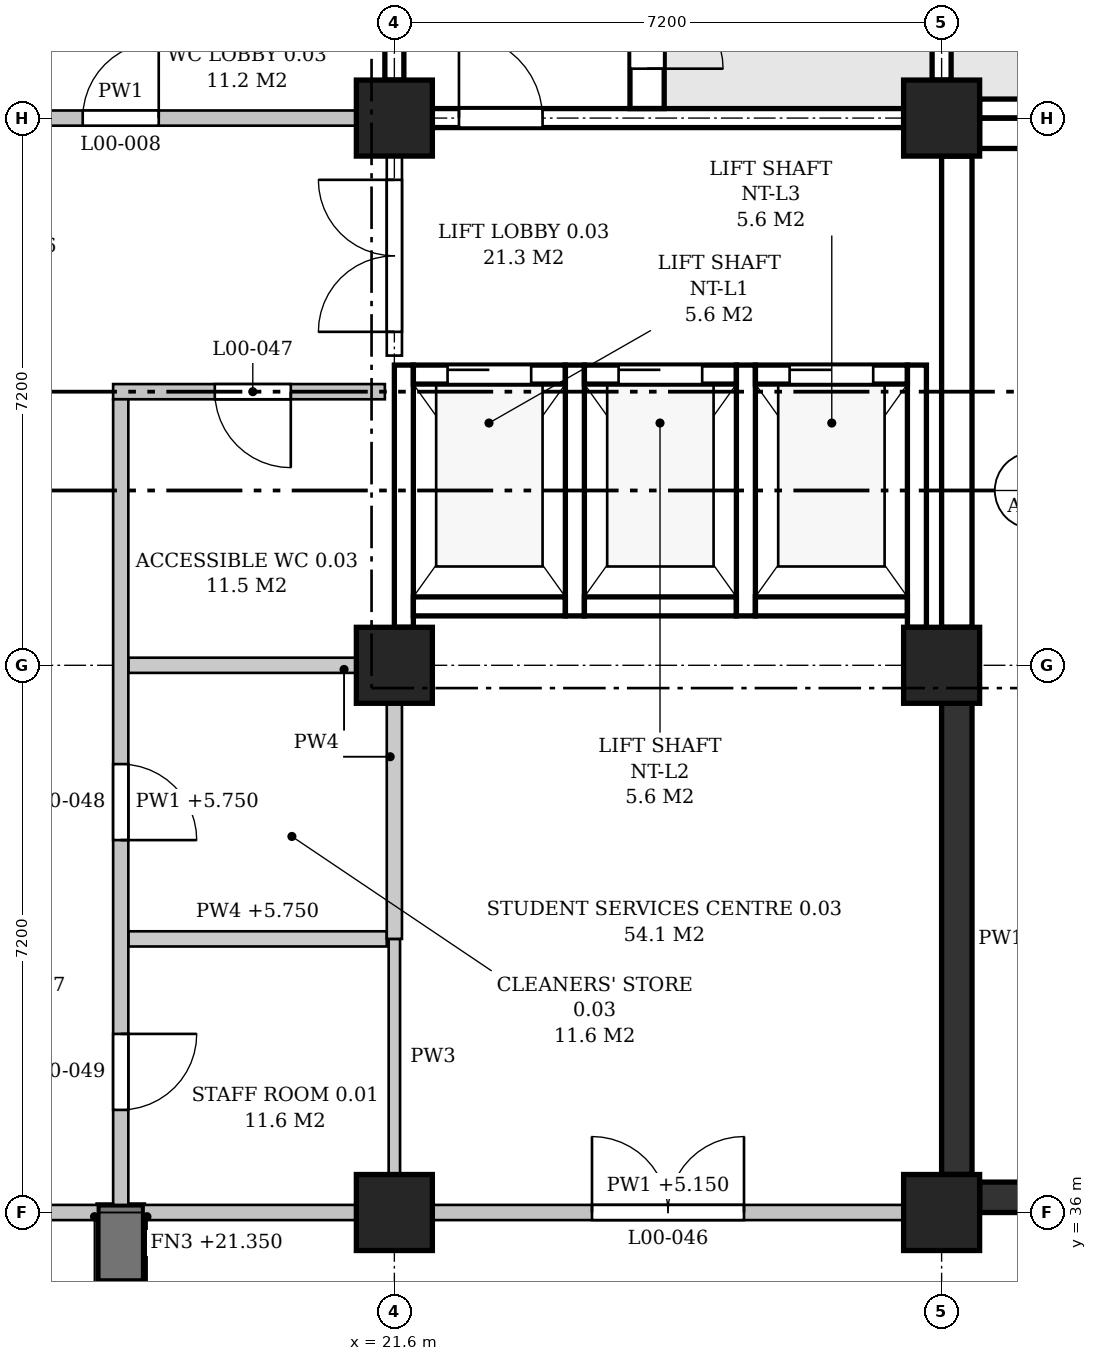
"""IFC4 building model, lengths in metres.
Left out: names, types, materials, properties, quantities, classifications, styles, units other than length and angle.
Written with IfcOpenShell. Run it as: python <this file> out.ifc"""

import sys

from ifc_helpers import new_model, si_unit, direction, frame, frame_2d, origin, origin_2d, place, context, subcontext, project, spatial, polyline, rectangle, outline, extrude, element, fill, save


model = new_model("IFC4")
c1 = context("Model", 3, precision=1e-05, world=origin(), true_north=direction((0.0, 1.0)))
c2 = subcontext(c1, "Body", "Model", "MODEL_VIEW")
j1 = project(units=[si_unit("LENGTHUNIT", "METRE"), si_unit("PLANEANGLEUNIT", "RADIAN")], contexts=[c1])
p1 = place(None, origin())
s1 = spatial("IfcSite", under=j1, at=p1, CompositionType="ELEMENT")
p2 = place(p1, origin())
s2 = spatial("IfcBuilding", under=s1, at=p2, CompositionType="ELEMENT")
p3 = place(p2, origin())
s3 = spatial("IfcBuildingStorey", under=s2, at=p3, CompositionType="ELEMENT", Elevation=0.0)
for number, where, z_axis, x_axis in (
    (1, (21.6, 36.0, 0.0), (0.0, 0.0, 1.0), (1.0, 0.0, 0.0)),
    (2, (21.6, 43.2, 0.0), (0.0, 0.0, 1.0), (1.0, 0.0, 0.0)),
    (3, (21.6, 50.4, 0.0), (0.0, 0.0, 1.0), (1.0, 0.0, 0.0)),
    (4, (28.8, 36.0, 0.0), (0.0, 0.0, 1.0), (1.0, 0.0, 0.0)),
    (5, (28.8, 43.2, 0.0), (0.0, 0.0, 1.0), (1.0, 0.0, 0.0)),
    (6, (28.8, 50.4, 0.0), (0.0, 0.0, 1.0), (1.0, 0.0, 0.0)),
):
    element("IfcColumn", number, at=place(p3, frame(where, z_axis=z_axis, x_axis=x_axis)), inside=s3, PredefinedType="COLUMN", context=c2, shape_type="SweptSolid", body=[
        extrude(rectangle(XDim=1.0, YDim=1.0, at=origin_2d()), origin(), (0.0, 0.0, 1.0), 6.0),
    ])
p4 = place(p3, frame((18.0, 36.1, 0.0), z_axis=(0.0, 0.0, 1.0), x_axis=(0.0, -1.0, 0.0)))
e7 = element("IfcWall", 7, at=p4, inside=s3, PredefinedType="POLYGONAL", context=c2, shape_type="SweptSolid", body=[
    extrude(outline(polyline([(1.0, 0.0), (1.0, 20.975), (0.75, 21.35), (0.35, 21.35), (0.35, 20.75), (0.0, 20.75), (0.0, 16.8), (0.35, 16.8), (0.35, 15.95), (0.0, 15.95), (0.0, 11.4), (0.35, 11.4), (0.35, 10.55), (0.0, 10.55), (0.0, 6.0), (0.35, 6.0), (0.35, 0.0), (1.0, 0.0)])), frame((0.0, 0.3, 0.0), z_axis=(0.0, -1.0, 0.0), x_axis=(1.0, 0.0, 0.0)), (0.0, 0.0, 1.0), 0.6),
])
p5 = place(p3, frame((29.3, 50.525, 0.0), z_axis=(0.0, 0.0, 1.0), x_axis=(1.0, 0.0, 0.0)))
e8 = element("IfcWall", 8, at=p5, inside=s3, PredefinedType="SHEAR", context=c2, shape_type="SweptSolid", body=[
    extrude(rectangle(XDim=6.275, YDim=0.25, at=frame_2d((3.137, 0.0))), origin(), (0.0, 0.0, 1.0), 5.05),
])
p6 = place(p3, frame((28.8, 50.9, -0.3), z_axis=(0.0, 0.0, 1.0), x_axis=(0.0, 1.0, 0.0)))
e9 = element("IfcWall", 9, at=p6, inside=s3, PredefinedType="SHEAR", context=c2, shape_type="SweptSolid", body=[
    extrude(rectangle(XDim=6.2, YDim=0.25, at=frame_2d((3.1, 0.0))), origin(), (0.0, 0.0, 1.0), 5.3),
])
p7 = place(p3, frame((22.1, 50.4, 0.0), z_axis=(0.0, 0.0, 1.0), x_axis=(1.0, 0.0, 0.0)))
e10 = element("IfcWall", 10, at=p7, inside=s3, PredefinedType="SHEAR", context=c2, shape_type="SweptSolid", body=[
    extrude(rectangle(XDim=6.2, YDim=0.25, at=frame_2d((3.1, 0.0))), origin(), (0.0, 0.0, 1.0), 5.0),
])
p8 = place(p7, frame((0.35, 0.0, 0.0)))
e11 = element("IfcOpeningElement", 11, at=p8, cuts=e10, PredefinedType="OPENING", context=c2, shape_type="SweptSolid", body=[
    extrude(rectangle(XDim=1.1, YDim=2.1, at=frame_2d((0.55, 1.05))), frame((0.0, 0.135, 0.0), z_axis=(0.0, -1.0, 0.0), x_axis=(1.0, 0.0, 0.0)), (0.0, 0.0, 1.0), 0.27),
])
p9 = place(p3, frame((21.6, 50.9, 0.0), z_axis=(0.0, 0.0, 1.0), x_axis=(0.0, 1.0, 0.0)))
e12 = element("IfcWall", 12, at=p9, inside=s3, PredefinedType="SHEAR", context=c2, shape_type="SweptSolid", body=[
    extrude(rectangle(XDim=6.2, YDim=0.25, at=frame_2d((3.1, 0.0))), origin(), (0.0, 0.0, 1.0), 5.0),
])
p10 = place(p3, frame((24.925, 50.525, 0.0), z_axis=(0.0, 0.0, 1.0), x_axis=(0.0, 1.0, 0.0)))
e13 = element("IfcWall", 13, at=p10, inside=s3, PredefinedType="SHEAR", context=c2, shape_type="SweptSolid", body=[
    extrude(rectangle(XDim=6.925, YDim=0.45, at=frame_2d((3.462, 0.0))), origin(), (0.0, 0.0, 1.0), 5.75),
])
p11 = place(p10, frame((0.525, 0.0, 0.0)))
e14 = element("IfcOpeningElement", 14, at=p11, cuts=e13, PredefinedType="OPENING", context=c2, shape_type="SweptSolid", body=[
    extrude(rectangle(XDim=1.0, YDim=2.1, at=frame_2d((0.5, 1.05))), frame((0.0, 0.235, 0.0), z_axis=(0.0, -1.0, 0.0), x_axis=(1.0, 0.0, 0.0)), (0.0, 0.0, 1.0), 0.47),
])
p12 = place(p3, frame((21.725, 43.7, -0.3), z_axis=(0.0, 0.0, 1.0), x_axis=(0.0, 1.0, 0.0)))
e15 = element("IfcWall", 15, at=p12, inside=s3, PredefinedType="SHEAR", context=c2, shape_type="SweptSolid", body=[
    extrude(rectangle(XDim=3.45, YDim=0.25, at=frame_2d((1.725, 0.0))), origin(), (0.0, 0.0, 1.0), 5.3),
])
for number, where, z_axis, x_axis in (
    (16, (23.975, 43.85, -0.3), (0.0, 0.0, 1.0), (0.0, 1.0, 0.0)),
    (17, (26.225, 43.85, -0.3), (0.0, 0.0, 1.0), (0.0, 1.0, 0.0)),
):
    element("IfcWall", number, at=place(p3, frame(where, z_axis=z_axis, x_axis=x_axis)), inside=s3, PredefinedType="SHEAR", context=c2, shape_type="SweptSolid", body=[
        extrude(rectangle(XDim=3.3, YDim=0.25, at=frame_2d((1.65, 0.0))), origin(), (0.0, 0.0, 1.0), 6.05),
    ])
p13 = place(p3, frame((28.475, 43.7, -0.3), z_axis=(0.0, 0.0, 1.0), x_axis=(0.0, 1.0, 0.0)))
e18 = element("IfcWall", 18, at=p13, inside=s3, PredefinedType="SHEAR", context=c2, shape_type="SweptSolid", body=[
    extrude(rectangle(XDim=3.45, YDim=0.25, at=frame_2d((1.725, 0.0))), origin(), (0.0, 0.0, 1.0), 5.35),
])
p14 = place(p3, frame((21.85, 47.025, -0.3), z_axis=(0.0, 0.0, 1.0), x_axis=(1.0, 0.0, 0.0)))
e19 = element("IfcWall", 19, at=p14, inside=s3, PredefinedType="SHEAR", context=c2, shape_type="SweptSolid", body=[
    extrude(rectangle(XDim=2.0, YDim=0.25, at=frame_2d((1.0, 0.0))), origin(), (0.0, 0.0, 1.0), 6.05),
])
p15 = place(p14, frame((0.45, 0.0, 0.3)))
e20 = element("IfcOpeningElement", 20, at=p15, cuts=e19, PredefinedType="OPENING", context=c2, shape_type="SweptSolid", body=[
    extrude(rectangle(XDim=1.1, YDim=2.1, at=frame_2d((0.55, 1.05))), frame((0.0, 0.135, 0.0), z_axis=(0.0, -1.0, 0.0), x_axis=(1.0, 0.0, 0.0)), (0.0, 0.0, 1.0), 0.27),
])
p16 = place(p3, frame((21.85, 43.975, -0.3), z_axis=(0.0, 0.0, 1.0), x_axis=(1.0, 0.0, 0.0)))
e21 = element("IfcWall", 21, at=p16, inside=s3, PredefinedType="SHEAR", context=c2, shape_type="SweptSolid", body=[
    extrude(rectangle(XDim=2.0, YDim=0.25, at=frame_2d((1.0, 0.0))), origin(), (0.0, 0.0, 1.0), 6.05),
])
p17 = place(p3, frame((24.1, 47.025, -0.3), z_axis=(0.0, 0.0, 1.0), x_axis=(1.0, 0.0, 0.0)))
e22 = element("IfcWall", 22, at=p17, inside=s3, PredefinedType="SHEAR", context=c2, shape_type="SweptSolid", body=[
    extrude(rectangle(XDim=2.0, YDim=0.25, at=frame_2d((1.0, 0.0))), origin(), (0.0, 0.0, 1.0), 6.05),
])
p18 = place(p17, frame((0.45, 0.0, 0.3)))
e23 = element("IfcOpeningElement", 23, at=p18, cuts=e22, PredefinedType="OPENING", context=c2, shape_type="SweptSolid", body=[
    extrude(rectangle(XDim=1.1, YDim=2.1, at=frame_2d((0.55, 1.05))), frame((0.0, 0.135, 0.0), z_axis=(0.0, -1.0, 0.0), x_axis=(1.0, 0.0, 0.0)), (0.0, 0.0, 1.0), 0.27),
])
p19 = place(p3, frame((24.1, 43.975, -0.3), z_axis=(0.0, 0.0, 1.0), x_axis=(1.0, 0.0, 0.0)))
e24 = element("IfcWall", 24, at=p19, inside=s3, PredefinedType="SHEAR", context=c2, shape_type="SweptSolid", body=[
    extrude(rectangle(XDim=2.0, YDim=0.25, at=frame_2d((1.0, 0.0))), origin(), (0.0, 0.0, 1.0), 6.05),
])
p20 = place(p3, frame((26.35, 47.025, -0.3), z_axis=(0.0, 0.0, 1.0), x_axis=(1.0, 0.0, 0.0)))
e25 = element("IfcWall", 25, at=p20, inside=s3, PredefinedType="SHEAR", context=c2, shape_type="SweptSolid", body=[
    extrude(rectangle(XDim=2.0, YDim=0.25, at=frame_2d((1.0, 0.0))), origin(), (0.0, 0.0, 1.0), 6.05),
])
p21 = place(p20, frame((0.45, 0.0, 0.3)))
e26 = element("IfcOpeningElement", 26, at=p21, cuts=e25, PredefinedType="OPENING", context=c2, shape_type="SweptSolid", body=[
    extrude(rectangle(XDim=1.1, YDim=2.1, at=frame_2d((0.55, 1.05))), frame((0.0, 0.135, 0.0), z_axis=(0.0, -1.0, 0.0), x_axis=(1.0, 0.0, 0.0)), (0.0, 0.0, 1.0), 0.27),
])
p22 = place(p3, frame((26.35, 43.975, -0.3), z_axis=(0.0, 0.0, 1.0), x_axis=(1.0, 0.0, 0.0)))
e27 = element("IfcWall", 27, at=p22, inside=s3, PredefinedType="SHEAR", context=c2, shape_type="SweptSolid", body=[
    extrude(rectangle(XDim=2.0, YDim=0.25, at=frame_2d((1.0, 0.0))), origin(), (0.0, 0.0, 1.0), 6.05),
])
p23 = place(p3, frame((14.9, 36.0, 0.0), z_axis=(0.0, 0.0, 1.0), x_axis=(1.0, 0.0, 0.0)))
e28 = element("IfcWall", 28, at=p23, inside=s3, PredefinedType="PARTITIONING", context=c2, shape_type="SweptSolid", body=[
    extrude(rectangle(XDim=2.8, YDim=0.2, at=frame_2d((1.4, 0.0))), origin(), (0.0, 0.0, 1.0), 5.15),
])
p24 = place(p23, frame((0.9, 0.0, 0.0)))
e29 = element("IfcOpeningElement", 29, at=p24, cuts=e28, PredefinedType="OPENING", context=c2, shape_type="SweptSolid", body=[
    extrude(rectangle(XDim=1.0, YDim=2.1, at=frame_2d((0.5, 1.05))), frame((0.0, 0.11, 0.0), z_axis=(0.0, -1.0, 0.0), x_axis=(1.0, 0.0, 0.0)), (0.0, 0.0, 1.0), 0.22),
])
p25 = place(p3, frame((18.3, 36.0, 0.0), z_axis=(0.0, 0.0, 1.0), x_axis=(1.0, 0.0, 0.0)))
e30 = element("IfcWall", 30, at=p25, inside=s3, PredefinedType="PARTITIONING", context=c2, shape_type="SweptSolid", body=[
    extrude(rectangle(XDim=2.8, YDim=0.2, at=frame_2d((1.4, 0.0))), origin(), (0.0, 0.0, 1.0), 5.15),
])
p26 = place(p3, frame((22.1, 36.0, 0.0), z_axis=(0.0, 0.0, 1.0), x_axis=(1.0, 0.0, 0.0)))
e31 = element("IfcWall", 31, at=p26, inside=s3, PredefinedType="PARTITIONING", context=c2, shape_type="SweptSolid", body=[
    extrude(rectangle(XDim=6.2, YDim=0.2, at=frame_2d((3.1, 0.0))), origin(), (0.0, 0.0, 1.0), 5.15),
])
p27 = place(p26, frame((2.1, 0.0, 0.0)))
e32 = element("IfcOpeningElement", 32, at=p27, cuts=e31, PredefinedType="OPENING", context=c2, shape_type="SweptSolid", body=[
    extrude(rectangle(XDim=2.0, YDim=2.1, at=frame_2d((1.0, 1.05))), frame((0.0, 0.11, 0.0), z_axis=(0.0, -1.0, 0.0), x_axis=(1.0, 0.0, 0.0)), (0.0, 0.0, 1.0), 0.22),
])
p28 = place(p3, frame((29.3, 36.2, 0.0), z_axis=(0.0, 0.0, 1.0), x_axis=(1.0, 0.0, 0.0)))
e33 = element("IfcWall", 33, at=p28, inside=s3, PredefinedType="SOLIDWALL", context=c2, shape_type="SweptSolid", body=[
    extrude(rectangle(XDim=6.275, YDim=0.4, at=frame_2d((3.137, 0.0))), origin(), (0.0, 0.0, 1.0), 10.7),
])
p29 = place(p3, frame((18.1, 39.6, 0.0), z_axis=(0.0, 0.0, 1.0), x_axis=(1.0, 0.0, 0.0)))
e34 = element("IfcWall", 34, at=p29, inside=s3, PredefinedType="PARTITIONING", context=c2, shape_type="SweptSolid", body=[
    extrude(outline(polyline([(0.0, 0.0), (3.4, 0.0), (3.4, 5.0), (3.25, 5.0), (3.25, 5.75), (0.0, 5.75), (0.0, 0.0)])), frame((0.0, 0.1, 0.0), z_axis=(0.0, -1.0, 0.0), x_axis=(1.0, 0.0, 0.0)), (0.0, 0.0, 1.0), 0.2),
])
p30 = place(p3, frame((18.1, 43.2, 0.0), z_axis=(0.0, 0.0, 1.0), x_axis=(1.0, 0.0, 0.0)))
e35 = element("IfcWall", 35, at=p30, inside=s3, PredefinedType="PARTITIONING", context=c2, shape_type="SweptSolid", body=[
    extrude(rectangle(XDim=3.0, YDim=0.2, at=frame_2d((1.5, 0.0))), origin(), (0.0, 0.0, 1.0), 5.0),
])
p31 = place(p3, frame((17.9, 46.8, 0.0), z_axis=(0.0, 0.0, 1.0), x_axis=(1.0, 0.0, 0.0)))
e36 = element("IfcWall", 36, at=p31, inside=s3, PredefinedType="PARTITIONING", context=c2, shape_type="SweptSolid", body=[
    extrude(outline(polyline([(0.0, 0.0), (3.575, 0.0), (3.575, 5.0), (3.45, 5.0), (3.45, 5.75), (0.0, 5.75), (0.0, 0.0)])), frame((0.0, 0.1, 0.0), z_axis=(0.0, -1.0, 0.0), x_axis=(1.0, 0.0, 0.0)), (0.0, 0.0, 1.0), 0.2),
])
p32 = place(p31, frame((1.338, 0.0, 0.0)))
e37 = element("IfcOpeningElement", 37, at=p32, cuts=e36, PredefinedType="OPENING", context=c2, shape_type="SweptSolid", body=[
    extrude(rectangle(XDim=1.0, YDim=2.1, at=frame_2d((0.5, 1.05))), frame((0.0, 0.11, 0.0), z_axis=(0.0, -1.0, 0.0), x_axis=(1.0, 0.0, 0.0)), (0.0, 0.0, 1.0), 0.22),
])
p33 = place(p3, frame((29.3, 50.2, 0.0), z_axis=(0.0, 0.0, 1.0), x_axis=(1.0, 0.0, 0.0)))
e38 = element("IfcWall", 38, at=p33, inside=s3, PredefinedType="SOLIDWALL", context=c2, shape_type="SweptSolid", body=[
    extrude(rectangle(XDim=6.275, YDim=0.4, at=frame_2d((3.137, 0.0))), origin(), (0.0, 0.0, 1.0), 10.7),
])
p34 = place(p3, frame((14.9, 50.4, 0.0), z_axis=(0.0, 0.0, 1.0), x_axis=(1.0, 0.0, 0.0)))
e39 = element("IfcWall", 39, at=p34, inside=s3, PredefinedType="PARTITIONING", context=c2, shape_type="SweptSolid", body=[
    extrude(rectangle(XDim=6.2, YDim=0.2, at=frame_2d((3.1, 0.0))), origin(), (0.0, 0.0, 1.0), 5.0),
])
p35 = place(p34, frame((2.6, 0.0, 0.0)))
e40 = element("IfcOpeningElement", 40, at=p35, cuts=e39, PredefinedType="OPENING", context=c2, shape_type="SweptSolid", body=[
    extrude(rectangle(XDim=1.0, YDim=2.1, at=frame_2d((0.5, 1.05))), frame((0.0, 0.11, 0.0), z_axis=(0.0, -1.0, 0.0), x_axis=(1.0, 0.0, 0.0)), (0.0, 0.0, 1.0), 0.22),
])
p36 = place(p3, frame((18.0, 36.1, 0.0), z_axis=(0.0, 0.0, 1.0), x_axis=(0.0, 1.0, 0.0)))
e41 = element("IfcWall", 41, at=p36, inside=s3, PredefinedType="PARTITIONING", context=c2, shape_type="SweptSolid", body=[
    extrude(outline(polyline([(0.0, 0.0), (10.6, 0.0), (10.6, 5.75), (7.35, 5.75), (7.35, 5.0), (6.85, 5.0), (6.85, 5.75), (0.15, 5.75), (0.15, 5.15), (0.0, 5.15), (0.0, 0.0)])), frame((0.0, 0.1, 0.0), z_axis=(0.0, -1.0, 0.0), x_axis=(1.0, 0.0, 0.0)), (0.0, 0.0, 1.0), 0.2),
])
p37 = place(p36, frame((4.8, 0.0, 0.0)))
e42 = element("IfcOpeningElement", 42, at=p37, cuts=e41, PredefinedType="OPENING", context=c2, shape_type="SweptSolid", body=[
    extrude(rectangle(XDim=1.0, YDim=2.1, at=frame_2d((0.5, 1.05))), frame((0.0, 0.11, 0.0), z_axis=(0.0, -1.0, 0.0), x_axis=(1.0, 0.0, 0.0)), (0.0, 0.0, 1.0), 0.22),
])
p38 = place(p36, frame((1.25, 0.0, 0.0)))
e43 = element("IfcOpeningElement", 43, at=p38, cuts=e41, PredefinedType="OPENING", context=c2, shape_type="SweptSolid", body=[
    extrude(rectangle(XDim=1.0, YDim=2.1, at=frame_2d((0.5, 1.05))), frame((0.0, 0.11, 0.0), z_axis=(0.0, -1.0, 0.0), x_axis=(1.0, 0.0, 0.0)), (0.0, 0.0, 1.0), 0.22),
])
p39 = place(p3, frame((21.6, 36.5, 0.0), z_axis=(0.0, 0.0, 1.0), x_axis=(0.0, 1.0, 0.0)))
e44 = element("IfcWall", 44, at=p39, inside=s3, PredefinedType="PARTITIONING", context=c2, shape_type="SweptSolid", body=[
    extrude(rectangle(XDim=3.1, YDim=0.15, at=frame_2d((1.55, 0.0))), origin(), (0.0, 0.0, 1.0), 5.0),
])
p40 = place(p3, frame((21.6, 39.6, 0.0), z_axis=(0.0, 0.0, 1.0), x_axis=(0.0, 1.0, 0.0)))
e45 = element("IfcWall", 45, at=p40, inside=s3, PredefinedType="PARTITIONING", context=c2, shape_type="SweptSolid", body=[
    extrude(rectangle(XDim=3.1, YDim=0.2, at=frame_2d((1.55, 0.0))), origin(), (0.0, 0.0, 1.0), 5.0),
])
p41 = place(p3, frame((21.6, 47.275, 0.0), z_axis=(0.0, 0.0, 1.0), x_axis=(0.0, 1.0, 0.0)))
e46 = element("IfcWall", 46, at=p41, inside=s3, PredefinedType="PARTITIONING", context=c2, shape_type="SweptSolid", body=[
    extrude(rectangle(XDim=2.625, YDim=0.2, at=frame_2d((1.312, 0.0))), origin(), (0.0, 0.0, 1.0), 5.0),
])
p42 = place(p41, frame((0.312, 0.0, 0.0)))
e47 = element("IfcOpeningElement", 47, at=p42, cuts=e46, PredefinedType="OPENING", context=c2, shape_type="SweptSolid", body=[
    extrude(rectangle(XDim=2.0, YDim=2.4, at=frame_2d((1.0, 1.2))), frame((0.0, 0.11, 0.0), z_axis=(0.0, -1.0, 0.0), x_axis=(1.0, 0.0, 0.0)), (0.0, 0.0, 1.0), 0.22),
])
for number, where, z_axis, x_axis in (
    (48, (29.0, 36.5, 0.0), (0.0, 0.0, 1.0), (0.0, 1.0, 0.0)),
    (49, (29.0, 43.7, 0.0), (0.0, 0.0, 1.0), (0.0, 1.0, 0.0)),
):
    element("IfcWall", number, at=place(p3, frame(where, z_axis=z_axis, x_axis=x_axis)), inside=s3, PredefinedType="SOLIDWALL", context=c2, shape_type="SweptSolid", body=[
        extrude(rectangle(XDim=6.2, YDim=0.4, at=frame_2d((3.1, 0.0))), origin(), (0.0, 0.0, 1.0), 10.55),
    ])
p43 = place(p11, frame((1.0, 0.0, 0.0), z_axis=(0.0, 0.0, 1.0), x_axis=(-1.0, 0.0, 0.0)))
e50 = element("IfcDoor", 50, at=p43, inside=s3, OperationType="SINGLE_SWING_RIGHT", PredefinedType="DOOR", context=c2, shape_type="SweptSolid", body=[
    extrude(rectangle(XDim=1.0, YDim=2.1, at=frame_2d((0.5, 1.05))), frame((0.0, 0.025, 0.0), z_axis=(0.0, -1.0, 0.0), x_axis=(1.0, 0.0, 0.0)), (0.0, 0.0, 1.0), 0.05),
])
fill(e14, e50)
p44 = place(p8, origin())
e51 = element("IfcDoor", 51, at=p44, inside=s3, OperationType="SINGLE_SWING_LEFT", PredefinedType="DOOR", context=c2, shape_type="SweptSolid", body=[
    extrude(rectangle(XDim=1.1, YDim=2.1, at=frame_2d((0.55, 1.05))), frame((0.0, 0.025, 0.0), z_axis=(0.0, -1.0, 0.0), x_axis=(1.0, 0.0, 0.0)), (0.0, 0.0, 1.0), 0.05),
])
fill(e11, e51)
p45 = place(p15, origin())
e52 = element("IfcDoor", 52, at=p45, inside=s3, OperationType="SLIDING_TO_LEFT", PredefinedType="DOOR", context=c2, shape_type="SweptSolid", body=[
    extrude(rectangle(XDim=1.1, YDim=2.1, at=frame_2d((0.55, 1.05))), frame((0.0, 0.025, 0.0), z_axis=(0.0, -1.0, 0.0), x_axis=(1.0, 0.0, 0.0)), (0.0, 0.0, 1.0), 0.05),
])
fill(e20, e52)
p46 = place(p18, origin())
e53 = element("IfcDoor", 53, at=p46, inside=s3, OperationType="SLIDING_TO_LEFT", PredefinedType="DOOR", context=c2, shape_type="SweptSolid", body=[
    extrude(rectangle(XDim=1.1, YDim=2.1, at=frame_2d((0.55, 1.05))), frame((0.0, 0.025, 0.0), z_axis=(0.0, -1.0, 0.0), x_axis=(1.0, 0.0, 0.0)), (0.0, 0.0, 1.0), 0.05),
])
fill(e23, e53)
p47 = place(p21, origin())
e54 = element("IfcDoor", 54, at=p47, inside=s3, OperationType="SLIDING_TO_LEFT", PredefinedType="DOOR", context=c2, shape_type="SweptSolid", body=[
    extrude(rectangle(XDim=1.1, YDim=2.1, at=frame_2d((0.55, 1.05))), frame((0.0, 0.025, 0.0), z_axis=(0.0, -1.0, 0.0), x_axis=(1.0, 0.0, 0.0)), (0.0, 0.0, 1.0), 0.05),
])
fill(e26, e54)
p48 = place(p42, origin())
e55 = element("IfcDoor", 55, at=p48, inside=s3, OperationType="DOUBLE_DOOR_SINGLE_SWING", PredefinedType="DOOR", context=c2, shape_type="SweptSolid", body=[
    extrude(rectangle(XDim=2.0, YDim=2.4, at=frame_2d((1.0, 1.2))), frame((0.0, 0.025, 0.0), z_axis=(0.0, -1.0, 0.0), x_axis=(1.0, 0.0, 0.0)), (0.0, 0.0, 1.0), 0.05),
])
fill(e47, e55)
p49 = place(p35, origin())
e56 = element("IfcDoor", 56, at=p49, inside=s3, OperationType="SINGLE_SWING_RIGHT", PredefinedType="DOOR", context=c2, shape_type="SweptSolid", body=[
    extrude(rectangle(XDim=1.0, YDim=2.1, at=frame_2d((0.5, 1.05))), frame((0.0, 0.025, 0.0), z_axis=(0.0, -1.0, 0.0), x_axis=(1.0, 0.0, 0.0)), (0.0, 0.0, 1.0), 0.05),
])
fill(e40, e56)
p50 = place(p27, origin())
e57 = element("IfcDoor", 57, at=p50, inside=s3, OperationType="DOUBLE_DOOR_SINGLE_SWING", PredefinedType="DOOR", context=c2, shape_type="SweptSolid", body=[
    extrude(rectangle(XDim=2.0, YDim=2.1, at=frame_2d((1.0, 1.05))), frame((0.0, 0.025, 0.0), z_axis=(0.0, -1.0, 0.0), x_axis=(1.0, 0.0, 0.0)), (0.0, 0.0, 1.0), 0.05),
])
fill(e32, e57)
p51 = place(p32, frame((1.0, 0.0, 0.0), z_axis=(0.0, 0.0, 1.0), x_axis=(-1.0, 0.0, 0.0)))
e58 = element("IfcDoor", 58, at=p51, inside=s3, OperationType="SINGLE_SWING_LEFT", PredefinedType="DOOR", context=c2, shape_type="SweptSolid", body=[
    extrude(rectangle(XDim=1.0, YDim=2.1, at=frame_2d((0.5, 1.05))), frame((0.0, 0.025, 0.0), z_axis=(0.0, -1.0, 0.0), x_axis=(1.0, 0.0, 0.0)), (0.0, 0.0, 1.0), 0.05),
])
fill(e37, e58)
p52 = place(p37, frame((1.0, 0.0, 0.0), z_axis=(0.0, 0.0, 1.0), x_axis=(-1.0, 0.0, 0.0)))
e59 = element("IfcDoor", 59, at=p52, inside=s3, OperationType="SINGLE_SWING_RIGHT", PredefinedType="DOOR", context=c2, shape_type="SweptSolid", body=[
    extrude(rectangle(XDim=1.0, YDim=2.1, at=frame_2d((0.5, 1.05))), frame((0.0, 0.025, 0.0), z_axis=(0.0, -1.0, 0.0), x_axis=(1.0, 0.0, 0.0)), (0.0, 0.0, 1.0), 0.05),
])
fill(e42, e59)
p53 = place(p38, frame((1.0, 0.0, 0.0), z_axis=(0.0, 0.0, 1.0), x_axis=(-1.0, 0.0, 0.0)))
e60 = element("IfcDoor", 60, at=p53, inside=s3, OperationType="SINGLE_SWING_LEFT", PredefinedType="DOOR", context=c2, shape_type="SweptSolid", body=[
    extrude(rectangle(XDim=1.0, YDim=2.1, at=frame_2d((0.5, 1.05))), frame((0.0, 0.025, 0.0), z_axis=(0.0, -1.0, 0.0), x_axis=(1.0, 0.0, 0.0)), (0.0, 0.0, 1.0), 0.05),
])
fill(e43, e60)
save(model, sys.argv[1])
